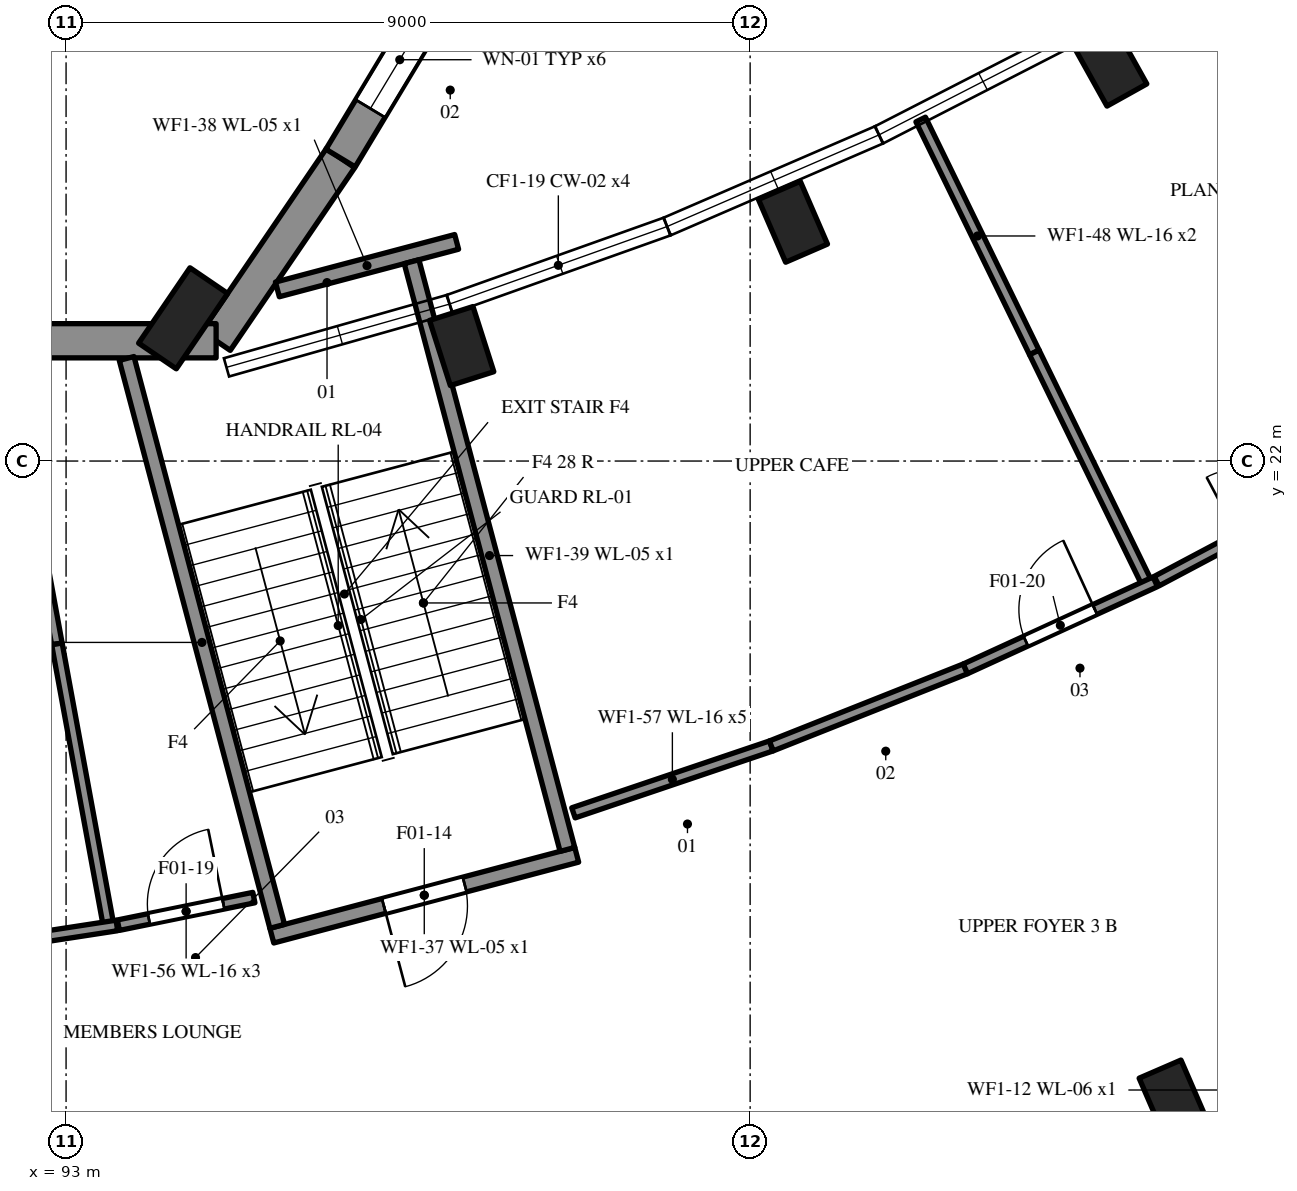
"""IFC4 building model, lengths in metres.
Left out: names, types, materials, properties, quantities, classifications, styles, units other than length and angle.
Written with IfcOpenShell. Run it as: python <this file> out.ifc"""

import sys

from ifc_helpers import new_model, si_unit, direction, frame, frame_2d, origin, origin_2d, place, context, subcontext, project, spatial, polyline, rectangle, outline, extrude, element, fill, save


model = new_model("IFC4")
c1 = context("Model", 3, precision=1e-05, world=origin(), true_north=direction((0.0, 1.0)))
c2 = subcontext(c1, "Body", "Model", "MODEL_VIEW")
j1 = project(units=[si_unit("LENGTHUNIT", "METRE"), si_unit("PLANEANGLEUNIT", "RADIAN")], contexts=[c1])
p1 = place(None, origin())
s1 = spatial("IfcSite", under=j1, at=p1, CompositionType="ELEMENT")
p2 = place(p1, origin())
s2 = spatial("IfcBuilding", under=s1, at=p2, CompositionType="ELEMENT")
p3 = place(p2, frame((0.0, 0.0, 5.4)))
s3 = spatial("IfcBuildingStorey", under=s2, at=p3, CompositionType="ELEMENT", Elevation=5.4)
p4 = place(p3, frame((94.974, 23.583, 0.0), z_axis=(0.0, 0.0, 1.0), x_axis=(0.5629642644, 0.826481238147, 0.0)))
e1 = element("IfcWall", 1, at=p4, inside=s3, PredefinedType="SOLIDWALL", context=c2, shape_type="SweptSolid", body=[
    extrude(rectangle(XDim=2.908, YDim=0.45, at=frame_2d((1.454, 0.0))), origin(), (0.0, 0.0, 1.0), 4.8),
])
p5 = place(p3, frame((96.611, 25.986, 0.0), z_axis=(0.0, 0.0, 1.0), x_axis=(0.515636119523, 0.856807675177, 0.0)))
e2 = element("IfcWall", 2, at=p5, inside=s3, PredefinedType="SOLIDWALL", context=c2, shape_type="SweptSolid", body=[
    extrude(rectangle(XDim=3.021, YDim=0.45, at=frame_2d((1.511, 0.0))), origin(), (0.0, 0.0, 1.0), 4.8),
])
p6 = place(p5, frame((0.76, 0.0, 0.9)))
e3 = element("IfcOpeningElement", 3, at=p6, cuts=e2, PredefinedType="OPENING", context=c2, shape_type="SweptSolid", body=[
    extrude(rectangle(XDim=1.5, YDim=2.1, at=frame_2d((0.75, 1.05))), frame((0.0, 0.235, 0.0), z_axis=(0.0, -1.0, 0.0), x_axis=(1.0, 0.0, 0.0)), (0.0, 0.0, 1.0), 0.47),
])
p7 = place(p3, frame((73.026, 23.583, 0.0), z_axis=(0.0, 0.0, 1.0), x_axis=(1.0, 0.0, 0.0)))
e4 = element("IfcWall", 4, at=p7, inside=s3, PredefinedType="SOLIDWALL", context=c2, shape_type="SweptSolid", body=[
    extrude(rectangle(XDim=21.948, YDim=0.45, at=frame_2d((10.974, 0.0))), origin(), (0.0, 0.0, 1.0), 4.8),
])
p8 = place(p3, frame((94.54, 23.878, 0.0), z_axis=(0.0, 0.0, 1.0), x_axis=(0.562978035902, 0.82647185741, 0.0)))
e5 = element("IfcColumn", 5, at=p8, inside=s3, PredefinedType="PILASTER", context=c2, shape_type="SweptSolid", body=[
    extrude(rectangle(XDim=1.2, YDim=0.6, at=origin_2d()), origin(), (0.0, 0.0, 1.0), 4.8),
])
for number, where, z_axis, x_axis in (
    (6, (98.205, 23.513, 0.0), (0.0, 0.0, 1.0), (0.304, -0.953, 0.0)),
    (7, (107.572, 13.586, 0.0), (0.0, 0.0, 1.0), (0.398, -0.918, 0.0)),
    (8, (102.563, 25.148, 0.0), (0.0, 0.0, 1.0), (0.398, -0.918, 0.0)),
    (9, (106.738, 27.209, 0.0), (0.0, 0.0, 1.0), (0.487, -0.873, 0.0)),
):
    element("IfcColumn", number, at=place(p3, frame(where, z_axis=z_axis, x_axis=x_axis)), inside=s3, PredefinedType="PILASTER", context=c2, shape_type="SweptSolid", body=[
        extrude(rectangle(XDim=0.9, YDim=0.6, at=origin_2d()), origin(), (0.0, 0.0, 1.0), 4.8),
    ])
p9 = place(p3, frame((107.879, 13.093, 0.0), z_axis=(0.0, 0.0, 1.0), x_axis=(0.906763139796, 0.421640377937, 0.0)))
e10 = element("IfcWall", 10, at=p9, inside=s3, PredefinedType="SHEAR", context=c2, shape_type="SweptSolid", body=[
    extrude(rectangle(XDim=2.996, YDim=0.25, at=frame_2d((1.498, 0.0))), origin(), (0.0, 0.0, 1.0), 4.556),
])
p10 = place(p9, frame((0.598, 0.0, 0.0)))
e11 = element("IfcOpeningElement", 11, at=p10, cuts=e10, PredefinedType="OPENING", context=c2, shape_type="SweptSolid", body=[
    extrude(rectangle(XDim=1.8, YDim=2.1, at=frame_2d((0.9, 1.05))), frame((0.0, 0.135, 0.0), z_axis=(0.0, -1.0, 0.0), x_axis=(1.0, 0.0, 0.0)), (0.0, 0.0, 1.0), 0.27),
])
p11 = place(p3, frame((107.879, 13.093, 4.556), z_axis=(0.0, 0.0, 1.0), x_axis=(0.906763139796, 0.421640377937, 0.0)))
e12 = element("IfcWall", 12, at=p11, inside=s3, PredefinedType="SHEAR", context=c2, shape_type="SweptSolid", body=[
    extrude(outline(polyline([(0.0, 0.0), (2.996, 0.0), (2.996, 0.449), (0.0, 0.723), (0.0, 0.0)])), frame((0.0, 0.125, 0.0), z_axis=(0.0, -1.0, 0.0), x_axis=(1.0, 0.0, 0.0)), (0.0, 0.0, 1.0), 0.25),
])
p12 = place(p3, frame((99.718, 16.819, 0.0), z_axis=(0.0, 0.0, 1.0), x_axis=(-0.966590417756, -0.256325894715, 0.0)))
e13 = element("IfcWall", 13, at=p12, inside=s3, PredefinedType="SHEAR", context=c2, shape_type="SweptSolid", body=[
    extrude(rectangle(XDim=4.15, YDim=0.2, at=frame_2d((2.075, 0.0))), origin(), (0.0, 0.0, 1.0), 4.8),
])
p13 = place(p12, frame((1.525, 0.0, 0.0)))
e14 = element("IfcOpeningElement", 14, at=p13, cuts=e13, PredefinedType="OPENING", context=c2, shape_type="SweptSolid", body=[
    extrude(rectangle(XDim=1.1, YDim=2.1, at=frame_2d((0.55, 1.05))), frame((0.0, 0.11, 0.0), z_axis=(0.0, -1.0, 0.0), x_axis=(1.0, 0.0, 0.0)), (0.0, 0.0, 1.0), 0.22),
])
p14 = place(p3, frame((98.138, 24.884, 0.0), z_axis=(0.0, 0.0, 1.0), x_axis=(-0.966582812495, -0.256354572009, 0.0)))
e15 = element("IfcWall", 15, at=p14, inside=s3, PredefinedType="SHEAR", context=c2, shape_type="SweptSolid", body=[
    extrude(rectangle(XDim=2.44, YDim=0.2, at=frame_2d((1.22, 0.0))), origin(), (0.0, 0.0, 1.0), 4.8),
])
p15 = place(p3, frame((99.596, 16.89, 0.0), z_axis=(0.0, 0.0, 1.0), x_axis=(-0.25631948932, 0.966592116352, 0.0)))
e16 = element("IfcWall", 16, at=p15, inside=s3, PredefinedType="SHEAR", context=c2, shape_type="SweptSolid", body=[
    extrude(rectangle(XDim=8.0, YDim=0.2, at=frame_2d((4.0, 0.0))), origin(), (0.0, 0.0, 1.0), 4.8),
])
p16 = place(p3, frame((95.778, 15.878, 0.0), z_axis=(0.0, 0.0, 1.0), x_axis=(-0.256333531377, 0.966588392591, 0.0)))
e17 = element("IfcWall", 17, at=p16, inside=s3, PredefinedType="SHEAR", context=c2, shape_type="SweptSolid", body=[
    extrude(rectangle(XDim=7.73, YDim=0.2, at=frame_2d((3.865, 0.0))), origin(), (0.0, 0.0, 1.0), 4.8),
])
p17 = place(p3, frame((92.196, 23.318, 0.0), z_axis=(0.0, 0.0, 1.0), x_axis=(0.180428728445, -0.983588061107, 0.0)))
e18 = element("IfcWall", 18, at=p17, inside=s3, PredefinedType="PARTITIONING", context=c2, shape_type="SweptSolid", body=[
    extrude(rectangle(XDim=3.786, YDim=0.14, at=frame_2d((1.893, 0.0))), origin(), (0.0, 0.0, 1.0), 4.58),
])
p18 = place(p3, frame((92.879, 19.594, 0.0), z_axis=(0.0, 0.0, 1.0), x_axis=(0.18037858071, -0.983597258852, 0.0)))
e19 = element("IfcWall", 19, at=p18, inside=s3, PredefinedType="PARTITIONING", context=c2, shape_type="SweptSolid", body=[
    extrude(rectangle(XDim=3.726, YDim=0.14, at=frame_2d((1.863, 0.0))), origin(), (0.0, 0.0, 1.0), 4.58),
])
p19 = place(p3, frame((104.244, 26.494, 0.0), z_axis=(0.0, 0.0, 1.0), x_axis=(0.438371440778, -0.898793902911, 0.0)))
e20 = element("IfcWall", 20, at=p19, inside=s3, PredefinedType="PARTITIONING", context=c2, shape_type="SweptSolid", body=[
    extrude(rectangle(XDim=3.41, YDim=0.14, at=frame_2d((1.705, 0.0))), origin(), (0.0, 0.0, 1.0), 4.848),
])
p20 = place(p3, frame((105.739, 23.429, 0.0), z_axis=(0.0, 0.0, 1.0), x_axis=(0.438417888835, -0.898771247175, 0.0)))
e21 = element("IfcWall", 21, at=p20, inside=s3, PredefinedType="PARTITIONING", context=c2, shape_type="SweptSolid", body=[
    extrude(rectangle(XDim=3.35, YDim=0.14, at=frame_2d((1.675, 0.0))), origin(), (0.0, 0.0, 1.0), 4.848),
])
p21 = place(p3, frame((90.42, 15.39, 0.0), z_axis=(0.0, 0.0, 1.0), x_axis=(0.988407735118, 0.151822755736, 0.0)))
e22 = element("IfcWall", 22, at=p21, inside=s3, PredefinedType="PARTITIONING", context=c2, shape_type="SweptSolid", body=[
    extrude(rectangle(XDim=3.287, YDim=0.14, at=frame_2d((1.644, 0.0))), origin(), (0.0, 0.0, 1.0), 4.58),
])
p22 = place(p21, frame((0.594, 0.0, 0.0)))
e23 = element("IfcOpeningElement", 23, at=p22, cuts=e22, PredefinedType="OPENING", context=c2, shape_type="SweptSolid", body=[
    extrude(rectangle(XDim=0.9, YDim=2.1, at=frame_2d((0.45, 1.05))), frame((0.0, 0.08, 0.0), z_axis=(0.0, -1.0, 0.0), x_axis=(1.0, 0.0, 0.0)), (0.0, 0.0, 1.0), 0.16),
])
p23 = place(p3, frame((93.688, 15.893, 0.0), z_axis=(0.0, 0.0, 1.0), x_axis=(0.979888212279, 0.199547216058, 0.0)))
e24 = element("IfcWall", 24, at=p23, inside=s3, PredefinedType="PARTITIONING", context=c2, shape_type="SweptSolid", body=[
    extrude(rectangle(XDim=1.819, YDim=0.14, at=frame_2d((0.91, 0.0))), origin(), (0.0, 0.0, 1.0), 4.58),
])
p24 = place(p23, frame((0.41, 0.0, 0.0)))
e25 = element("IfcOpeningElement", 25, at=p24, cuts=e24, PredefinedType="OPENING", context=c2, shape_type="SweptSolid", body=[
    extrude(rectangle(XDim=1.0, YDim=2.1, at=frame_2d((0.5, 1.05))), frame((0.0, 0.08, 0.0), z_axis=(0.0, -1.0, 0.0), x_axis=(1.0, 0.0, 0.0)), (0.0, 0.0, 1.0), 0.16),
])
for number, where, z_axis, x_axis in (
    (26, (99.675, 17.371, 0.0), (0.0, 0.0, 1.0), (0.947, 0.32, 0.0)),
    (27, (102.278, 18.252, 0.0), (0.0, 0.0, 1.0), (0.929, 0.369, 0.0)),
):
    element("IfcWall", number, at=place(p3, frame(where, z_axis=z_axis, x_axis=x_axis)), inside=s3, PredefinedType="PARTITIONING", context=c2, shape_type="SweptSolid", body=[
        extrude(rectangle(XDim=2.748, YDim=0.14, at=frame_2d((1.374, 0.0))), origin(), (0.0, 0.0, 1.0), 5.958),
    ])
p25 = place(p3, frame((104.832, 19.266, 0.0), z_axis=(0.0, 0.0, 1.0), x_axis=(0.909004519067, 0.41678625735, 0.0)))
e28 = element("IfcWall", 28, at=p25, inside=s3, PredefinedType="PARTITIONING", context=c2, shape_type="SweptSolid", body=[
    extrude(rectangle(XDim=2.748, YDim=0.14, at=frame_2d((1.374, 0.0))), origin(), (0.0, 0.0, 1.0), 5.958),
])
p26 = place(p25, frame((0.874, 0.0, 0.0)))
e29 = element("IfcOpeningElement", 29, at=p26, cuts=e28, PredefinedType="OPENING", context=c2, shape_type="SweptSolid", body=[
    extrude(rectangle(XDim=1.0, YDim=2.1, at=frame_2d((0.5, 1.05))), frame((0.0, 0.08, 0.0), z_axis=(0.0, -1.0, 0.0), x_axis=(1.0, 0.0, 0.0)), (0.0, 0.0, 1.0), 0.16),
])
p27 = place(p3, frame((107.348, 20.42, 0.0), z_axis=(0.0, 0.0, 1.0), x_axis=(0.88338973931, 0.468639059918, 0.0)))
e30 = element("IfcWall", 30, at=p27, inside=s3, PredefinedType="PARTITIONING", context=c2, shape_type="SweptSolid", body=[
    extrude(rectangle(XDim=3.344, YDim=0.14, at=frame_2d((1.672, 0.0))), origin(), (0.0, 0.0, 1.0), 4.848),
])
p28 = place(p27, frame((1.222, 0.0, 0.0)))
e31 = element("IfcOpeningElement", 31, at=p28, cuts=e30, PredefinedType="OPENING", context=c2, shape_type="SweptSolid", body=[
    extrude(rectangle(XDim=0.9, YDim=2.1, at=frame_2d((0.45, 1.05))), frame((0.0, 0.08, 0.0), z_axis=(0.0, -1.0, 0.0), x_axis=(1.0, 0.0, 0.0)), (0.0, 0.0, 1.0), 0.16),
])
p29 = place(p6, origin())
e32 = element("IfcWindow", 32, at=p29, inside=s3, PartitioningType="SINGLE_PANEL", PredefinedType="WINDOW", context=c2, shape_type="SweptSolid", body=[
    extrude(rectangle(XDim=1.5, YDim=2.1, at=frame_2d((0.75, 1.05))), frame((0.0, 0.03, 0.0), z_axis=(0.0, -1.0, 0.0), x_axis=(1.0, 0.0, 0.0)), (0.0, 0.0, 1.0), 0.06),
])
fill(e3, e32)
p30 = place(p13, origin())
e33 = element("IfcDoor", 33, at=p30, inside=s3, OperationType="SINGLE_SWING_RIGHT", PredefinedType="DOOR", context=c2, shape_type="SweptSolid", body=[
    extrude(rectangle(XDim=1.1, YDim=2.1, at=frame_2d((0.55, 1.05))), frame((0.0, 0.025, 0.0), z_axis=(0.0, -1.0, 0.0), x_axis=(1.0, 0.0, 0.0)), (0.0, 0.0, 1.0), 0.05),
])
fill(e14, e33)
p31 = place(p24, origin())
e34 = element("IfcDoor", 34, at=p31, inside=s3, OperationType="SINGLE_SWING_RIGHT", PredefinedType="DOOR", context=c2, shape_type="SweptSolid", body=[
    extrude(rectangle(XDim=1.0, YDim=2.1, at=frame_2d((0.5, 1.05))), frame((0.0, 0.025, 0.0), z_axis=(0.0, -1.0, 0.0), x_axis=(1.0, 0.0, 0.0)), (0.0, 0.0, 1.0), 0.05),
])
fill(e25, e34)
p32 = place(p26, origin())
e35 = element("IfcDoor", 35, at=p32, inside=s3, OperationType="SINGLE_SWING_RIGHT", PredefinedType="DOOR", context=c2, shape_type="SweptSolid", body=[
    extrude(rectangle(XDim=1.0, YDim=2.1, at=frame_2d((0.5, 1.05))), frame((0.0, 0.025, 0.0), z_axis=(0.0, -1.0, 0.0), x_axis=(1.0, 0.0, 0.0)), (0.0, 0.0, 1.0), 0.05),
])
fill(e29, e35)
save(model, sys.argv[1])
